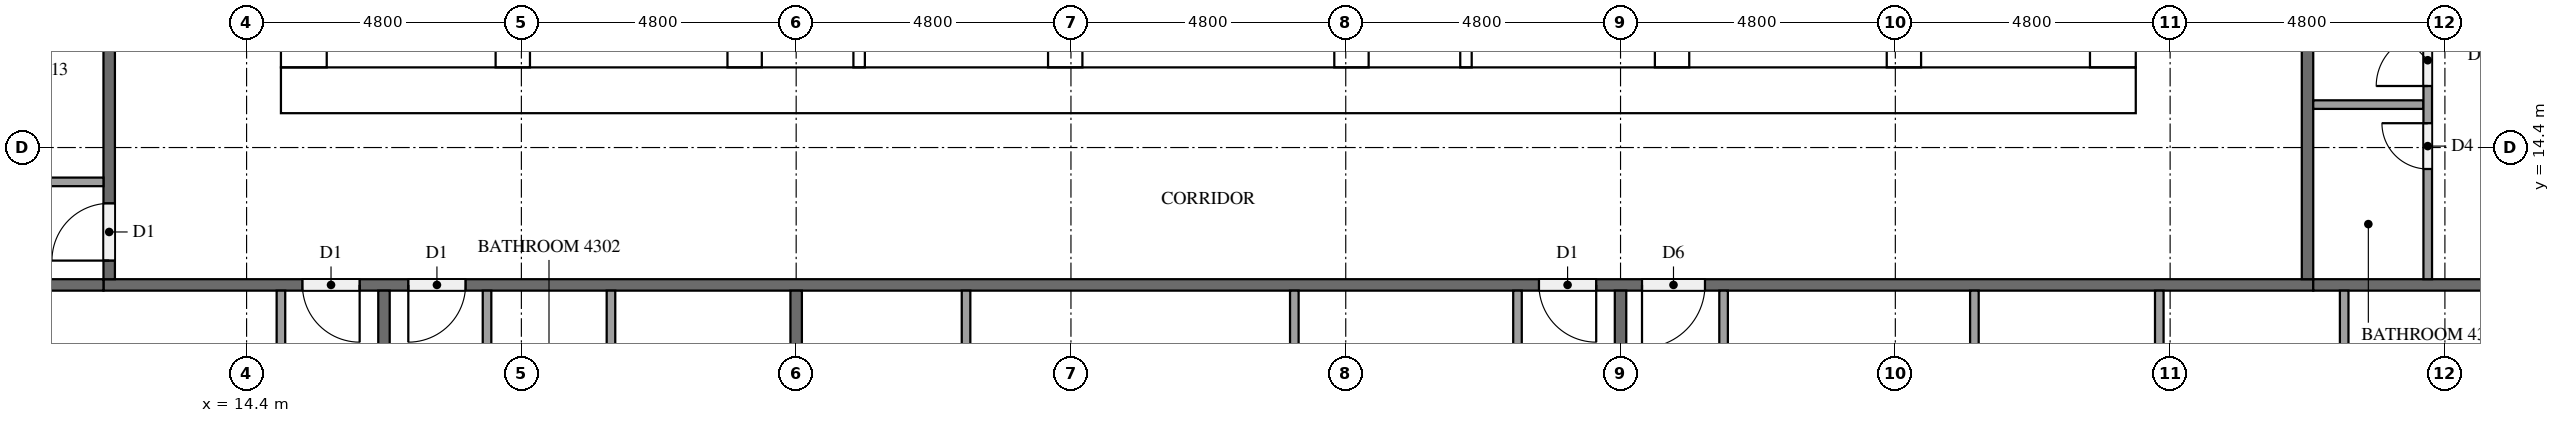
"""IFC4 building model, lengths in metres.
Left out: names, types, materials, properties, quantities, classifications, styles, units other than length and angle.
Written with IfcOpenShell. Run it as: python <this file> out.ifc"""

import sys

from ifc_helpers import new_model, si_unit, direction, frame, frame_2d, origin, place, context, subcontext, project, spatial, rectangle, extrude, element, fill, save


model = new_model("IFC4")
c1 = context("Model", 3, precision=1e-05, world=origin(), true_north=direction((0.0, 1.0)))
c2 = subcontext(c1, "Body", "Model", "MODEL_VIEW")
j1 = project(units=[si_unit("LENGTHUNIT", "METRE"), si_unit("PLANEANGLEUNIT", "RADIAN")], contexts=[c1])
p1 = place(None, origin())
s1 = spatial("IfcSite", under=j1, at=p1, CompositionType="ELEMENT")
p2 = place(p1, origin())
s2 = spatial("IfcBuilding", under=s1, at=p2, CompositionType="ELEMENT")
p3 = place(p2, frame((0.0, 0.0, 166.5)))
s3 = spatial("IfcBuildingStorey", under=s2, at=p3, CompositionType="ELEMENT", Elevation=166.5)
p4 = place(p3, frame((15.0, 15.4, 0.0), z_axis=(0.0, 0.0, 1.0), x_axis=(1.0, 0.0, 0.0)))
e1 = element("IfcWall", 1, at=p4, inside=s3, PredefinedType="SHEAR", context=c2, shape_type="SweptSolid", body=[
    extrude(rectangle(XDim=32.4, YDim=0.8, at=frame_2d((16.2, 0.0))), origin(), (0.0, 0.0, 1.0), 3.2),
])
p5 = place(p4, frame((15.3, 0.0, 0.0)))
e2 = element("IfcOpeningElement", 2, at=p5, cuts=e1, PredefinedType="OPENING", context=c2, shape_type="SweptSolid", body=[
    extrude(rectangle(XDim=1.8, YDim=2.1, at=frame_2d((0.9, 1.05))), frame((0.0, 0.41, 0.0), z_axis=(0.0, -1.0, 0.0), x_axis=(1.0, 0.0, 0.0)), (0.0, 0.0, 1.0), 0.82),
])
p6 = place(p3, frame((15.4, 15.8, 0.0), z_axis=(0.0, 0.0, 1.0), x_axis=(0.0, 1.0, 0.0)))
e3 = element("IfcWall", 3, at=p6, inside=s3, PredefinedType="SHEAR", context=c2, shape_type="SweptSolid", body=[
    extrude(rectangle(XDim=21.2, YDim=0.8, at=frame_2d((10.6, 0.0))), origin(), (0.0, 0.0, 1.0), 3.2),
])
p7 = place(p6, frame((4.96, 0.0, 0.0)))
e4 = element("IfcOpeningElement", 4, at=p7, cuts=e3, PredefinedType="OPENING", context=c2, shape_type="SweptSolid", body=[
    extrude(rectangle(XDim=1.2, YDim=2.1, at=frame_2d((0.6, 1.05))), frame((0.0, 0.41, 0.0), z_axis=(0.0, -1.0, 0.0), x_axis=(1.0, 0.0, 0.0)), (0.0, 0.0, 1.0), 0.82),
])
p8 = place(p3, frame((47.0, 15.8, 0.0), z_axis=(0.0, 0.0, 1.0), x_axis=(0.0, 1.0, 0.0)))
e5 = element("IfcWall", 5, at=p8, inside=s3, PredefinedType="SHEAR", context=c2, shape_type="SweptSolid", body=[
    extrude(rectangle(XDim=21.2, YDim=0.8, at=frame_2d((10.6, 0.0))), origin(), (0.0, 0.0, 1.0), 3.2),
])
p9 = place(p8, frame((10.3, 0.0, 0.0)))
e6 = element("IfcOpeningElement", 6, at=p9, cuts=e5, PredefinedType="OPENING", context=c2, shape_type="SweptSolid", body=[
    extrude(rectangle(XDim=1.2, YDim=2.1, at=frame_2d((0.6, 1.05))), frame((0.0, 0.41, 0.0), z_axis=(0.0, -1.0, 0.0), x_axis=(1.0, 0.0, 0.0)), (0.0, 0.0, 1.0), 0.82),
])
p10 = place(p3, frame((19.05, 15.8, 0.0), z_axis=(0.0, 0.0, 1.0), x_axis=(0.0, 1.0, 0.0)))
e7 = element("IfcWall", 7, at=p10, inside=s3, PredefinedType="SHEAR", context=c2, shape_type="SweptSolid", body=[
    extrude(rectangle(XDim=15.15, YDim=0.6, at=frame_2d((7.575, 0.0))), origin(), (0.0, 0.0, 1.0), 3.2),
])
p11 = place(p10, frame((9.65, 0.0, 0.0)))
e8 = element("IfcOpeningElement", 8, at=p11, cuts=e7, PredefinedType="OPENING", context=c2, shape_type="SweptSolid", body=[
    extrude(rectangle(XDim=1.1, YDim=2.1, at=frame_2d((0.55, 1.05))), frame((0.0, 0.31, 0.0), z_axis=(0.0, -1.0, 0.0), x_axis=(1.0, 0.0, 0.0)), (0.0, 0.0, 1.0), 0.62),
])
p12 = place(p10, frame((13.15, 0.0, 0.0)))
e9 = element("IfcOpeningElement", 9, at=p12, cuts=e7, PredefinedType="OPENING", context=c2, shape_type="SweptSolid", body=[
    extrude(rectangle(XDim=1.1, YDim=2.1, at=frame_2d((0.55, 1.05))), frame((0.0, 0.31, 0.0), z_axis=(0.0, -1.0, 0.0), x_axis=(1.0, 0.0, 0.0)), (0.0, 0.0, 1.0), 0.62),
])
p13 = place(p10, frame((0.4, 0.0, 0.0)))
e10 = element("IfcOpeningElement", 10, at=p13, cuts=e7, PredefinedType="OPENING", context=c2, shape_type="SweptSolid", body=[
    extrude(rectangle(XDim=1.2, YDim=2.1, at=frame_2d((0.6, 1.05))), frame((0.0, 0.31, 0.0), z_axis=(0.0, -1.0, 0.0), x_axis=(1.0, 0.0, 0.0)), (0.0, 0.0, 1.0), 0.62),
])
p14 = place(p3, frame((23.1, 15.8, 0.0), z_axis=(0.0, 0.0, 1.0), x_axis=(0.0, 1.0, 0.0)))
e11 = element("IfcWall", 11, at=p14, inside=s3, PredefinedType="SHEAR", context=c2, shape_type="SweptSolid", body=[
    extrude(rectangle(XDim=21.2, YDim=0.6, at=frame_2d((10.6, 0.0))), origin(), (0.0, 0.0, 1.0), 3.2),
])
p15 = place(p3, frame((39.3, 15.8, 0.0), z_axis=(0.0, 0.0, 1.0), x_axis=(0.0, 1.0, 0.0)))
e12 = element("IfcWall", 12, at=p15, inside=s3, PredefinedType="SHEAR", context=c2, shape_type="SweptSolid", body=[
    extrude(rectangle(XDim=8.45, YDim=0.6, at=frame_2d((4.225, 0.0))), origin(), (0.0, 0.0, 1.0), 3.2),
])
p16 = place(p3, frame((43.35, 15.8, 0.0), z_axis=(0.0, 0.0, 1.0), x_axis=(0.0, 1.0, 0.0)))
e13 = element("IfcWall", 13, at=p16, inside=s3, PredefinedType="SHEAR", context=c2, shape_type="SweptSolid", body=[
    extrude(rectangle(XDim=8.45, YDim=0.6, at=frame_2d((4.225, 0.0))), origin(), (0.0, 0.0, 1.0), 3.2),
])
p17 = place(p16, frame((0.4, 0.0, 0.0)))
e14 = element("IfcOpeningElement", 14, at=p17, cuts=e13, PredefinedType="OPENING", context=c2, shape_type="SweptSolid", body=[
    extrude(rectangle(XDim=1.2, YDim=2.1, at=frame_2d((0.6, 1.05))), frame((0.0, 0.31, 0.0), z_axis=(0.0, -1.0, 0.0), x_axis=(1.0, 0.0, 0.0)), (0.0, 0.0, 1.0), 0.62),
])
for number, where, z_axis, x_axis in (
    (15, (28.7, 15.8, 0.0), (0.0, 0.0, 1.0), (0.0, 1.0, 0.0)),
    (16, (33.7, 15.8, 0.0), (0.0, 0.0, 1.0), (0.0, 1.0, 0.0)),
):
    element("IfcWall", number, at=place(p3, frame(where, z_axis=z_axis, x_axis=x_axis)), inside=s3, PredefinedType="SHEAR", context=c2, shape_type="SweptSolid", body=[
        extrude(rectangle(XDim=2.65, YDim=0.6, at=frame_2d((1.325, 0.0))), origin(), (0.0, 0.0, 1.0), 3.2),
    ])
for number, where, z_axis, x_axis in (
    (17, (25.1, 15.8, 0.0), (0.0, 0.0, 1.0), (0.0, 1.0, 0.0)),
    (18, (35.7, 15.8, 0.0), (0.0, 0.0, 1.0), (0.0, 1.0, 0.0)),
):
    element("IfcWall", number, at=place(p3, frame(where, z_axis=z_axis, x_axis=x_axis)), inside=s3, PredefinedType="PARTITIONING", context=c2, shape_type="SweptSolid", body=[
        extrude(rectangle(XDim=2.65, YDim=0.2, at=frame_2d((1.325, 0.0))), origin(), (0.0, 0.0, 1.0), 3.2),
    ])
p18 = place(p3, frame((50.5, 12.0, 0.0), z_axis=(0.0, 0.0, 1.0), x_axis=(-1.0, 0.0, 0.0)))
e19 = element("IfcWall", 19, at=p18, inside=s3, PredefinedType="PARTITIONING", context=c2, shape_type="SweptSolid", body=[
    extrude(rectangle(XDim=38.6, YDim=0.2, at=frame_2d((19.3, 0.0))), origin(), (0.0, 0.0, 1.0), 3.2),
])
p19 = place(p18, frame((34.125, 0.0, 0.0)))
e20 = element("IfcOpeningElement", 20, at=p19, cuts=e19, PredefinedType="OPENING", context=c2, shape_type="SweptSolid", body=[
    extrude(rectangle(XDim=1.0, YDim=2.1, at=frame_2d((0.5, 1.05))), frame((0.0, 0.11, 0.0), z_axis=(0.0, -1.0, 0.0), x_axis=(1.0, 0.0, 0.0)), (0.0, 0.0, 1.0), 0.22),
])
p20 = place(p18, frame((32.275, 0.0, 0.0)))
e21 = element("IfcOpeningElement", 21, at=p20, cuts=e19, PredefinedType="OPENING", context=c2, shape_type="SweptSolid", body=[
    extrude(rectangle(XDim=1.0, YDim=2.1, at=frame_2d((0.5, 1.05))), frame((0.0, 0.11, 0.0), z_axis=(0.0, -1.0, 0.0), x_axis=(1.0, 0.0, 0.0)), (0.0, 0.0, 1.0), 0.22),
])
p21 = place(p18, frame((12.525, 0.0, 0.0)))
e22 = element("IfcOpeningElement", 22, at=p21, cuts=e19, PredefinedType="OPENING", context=c2, shape_type="SweptSolid", body=[
    extrude(rectangle(XDim=1.0, YDim=2.1, at=frame_2d((0.5, 1.05))), frame((0.0, 0.11, 0.0), z_axis=(0.0, -1.0, 0.0), x_axis=(1.0, 0.0, 0.0)), (0.0, 0.0, 1.0), 0.22),
])
p22 = place(p18, frame((10.625, 0.0, 0.0)))
e23 = element("IfcOpeningElement", 23, at=p22, cuts=e19, PredefinedType="OPENING", context=c2, shape_type="SweptSolid", body=[
    extrude(rectangle(XDim=1.1, YDim=2.1, at=frame_2d((0.55, 1.05))), frame((0.0, 0.11, 0.0), z_axis=(0.0, -1.0, 0.0), x_axis=(1.0, 0.0, 0.0)), (0.0, 0.0, 1.0), 0.22),
])
p23 = place(p3, frame((50.4, 40.7, 0.0), z_axis=(0.0, 0.0, 1.0), x_axis=(0.0, -1.0, 0.0)))
e24 = element("IfcWall", 24, at=p23, inside=s3, PredefinedType="PARTITIONING", context=c2, shape_type="SweptSolid", body=[
    extrude(rectangle(XDim=28.6, YDim=0.2, at=frame_2d((14.3, 0.0))), origin(), (0.0, 0.0, 1.0), 3.2),
])
p24 = place(p23, frame((19.525, 0.0, 0.0)))
e25 = element("IfcOpeningElement", 25, at=p24, cuts=e24, PredefinedType="OPENING", context=c2, shape_type="SweptSolid", body=[
    extrude(rectangle(XDim=1.0, YDim=2.1, at=frame_2d((0.5, 1.05))), frame((0.0, 0.11, 0.0), z_axis=(0.0, -1.0, 0.0), x_axis=(1.0, 0.0, 0.0)), (0.0, 0.0, 1.0), 0.22),
])
p25 = place(p23, frame((17.675, 0.0, 0.0)))
e26 = element("IfcOpeningElement", 26, at=p25, cuts=e24, PredefinedType="OPENING", context=c2, shape_type="SweptSolid", body=[
    extrude(rectangle(XDim=1.0, YDim=2.1, at=frame_2d((0.5, 1.05))), frame((0.0, 0.11, 0.0), z_axis=(0.0, -1.0, 0.0), x_axis=(1.0, 0.0, 0.0)), (0.0, 0.0, 1.0), 0.22),
])
p26 = place(p23, frame((8.075, 0.0, 0.0)))
e27 = element("IfcOpeningElement", 27, at=p26, cuts=e24, PredefinedType="OPENING", context=c2, shape_type="SweptSolid", body=[
    extrude(rectangle(XDim=1.0, YDim=2.1, at=frame_2d((0.5, 1.05))), frame((0.0, 0.11, 0.0), z_axis=(0.0, -1.0, 0.0), x_axis=(1.0, 0.0, 0.0)), (0.0, 0.0, 1.0), 0.22),
])
p27 = place(p3, frame((12.0, 12.1, 0.0), z_axis=(0.0, 0.0, 1.0), x_axis=(0.0, 1.0, 0.0)))
e28 = element("IfcWall", 28, at=p27, inside=s3, PredefinedType="PARTITIONING", context=c2, shape_type="SweptSolid", body=[
    extrude(rectangle(XDim=28.6, YDim=0.2, at=frame_2d((14.3, 0.0))), origin(), (0.0, 0.0, 1.0), 3.2),
])
p28 = place(p27, frame((24.325, 0.0, 0.0)))
e29 = element("IfcOpeningElement", 29, at=p28, cuts=e28, PredefinedType="OPENING", context=c2, shape_type="SweptSolid", body=[
    extrude(rectangle(XDim=1.0, YDim=2.1, at=frame_2d((0.5, 1.05))), frame((0.0, 0.11, 0.0), z_axis=(0.0, -1.0, 0.0), x_axis=(1.0, 0.0, 0.0)), (0.0, 0.0, 1.0), 0.22),
])
p29 = place(p27, frame((22.475, 0.0, 0.0)))
e30 = element("IfcOpeningElement", 30, at=p29, cuts=e28, PredefinedType="OPENING", context=c2, shape_type="SweptSolid", body=[
    extrude(rectangle(XDim=1.0, YDim=2.1, at=frame_2d((0.5, 1.05))), frame((0.0, 0.11, 0.0), z_axis=(0.0, -1.0, 0.0), x_axis=(1.0, 0.0, 0.0)), (0.0, 0.0, 1.0), 0.22),
])
p30 = place(p27, frame((0.325, 0.0, 0.0)))
e31 = element("IfcOpeningElement", 31, at=p30, cuts=e28, PredefinedType="OPENING", context=c2, shape_type="SweptSolid", body=[
    extrude(rectangle(XDim=1.0, YDim=2.1, at=frame_2d((0.5, 1.05))), frame((0.0, 0.11, 0.0), z_axis=(0.0, -1.0, 0.0), x_axis=(1.0, 0.0, 0.0)), (0.0, 0.0, 1.0), 0.22),
])
for number, where, z_axis, x_axis in (
    (32, (16.8, 11.9, 0.0), (0.0, 0.0, 1.0), (0.0, -1.0, 0.0)),
    (33, (0.1, 12.0, 0.0), (0.0, 0.0, 1.0), (1.0, 0.0, 0.0)),
):
    element("IfcWall", number, at=place(p3, frame(where, z_axis=z_axis, x_axis=x_axis)), inside=s3, PredefinedType="PARTITIONING", context=c2, shape_type="SweptSolid", body=[
        extrude(rectangle(XDim=11.8, YDim=0.2, at=frame_2d((5.9, 0.0))), origin(), (0.0, 0.0, 1.0), 3.2),
    ])
p31 = place(p3, frame((24.0, 11.9, 0.0), z_axis=(0.0, 0.0, 1.0), x_axis=(0.0, -1.0, 0.0)))
e34 = element("IfcWall", 34, at=p31, inside=s3, PredefinedType="PARTITIONING", context=c2, shape_type="SweptSolid", body=[
    extrude(rectangle(XDim=11.525, YDim=0.2, at=frame_2d((5.762, 0.0))), origin(), (0.0, 0.0, 1.0), 3.2),
])
p32 = place(p3, frame((38.4, 11.9, 0.0), z_axis=(0.0, 0.0, 1.0), x_axis=(0.0, -1.0, 0.0)))
e35 = element("IfcWall", 35, at=p32, inside=s3, PredefinedType="PARTITIONING", context=c2, shape_type="SweptSolid", body=[
    extrude(rectangle(XDim=11.8, YDim=0.2, at=frame_2d((5.9, 0.0))), origin(), (0.0, 0.0, 1.0), 3.2),
])
p33 = place(p3, frame((50.5, 12.0, 0.0), z_axis=(0.0, 0.0, 1.0), x_axis=(1.0, 0.0, 0.0)))
e36 = element("IfcWall", 36, at=p33, inside=s3, PredefinedType="PARTITIONING", context=c2, shape_type="SweptSolid", body=[
    extrude(rectangle(XDim=7.0, YDim=0.2, at=frame_2d((3.5, 0.0))), origin(), (0.0, 0.0, 1.0), 3.2),
])
p34 = place(p3, frame((15.0, 11.9, 0.0), z_axis=(0.0, 0.0, 1.0), x_axis=(0.0, -1.0, 0.0)))
e37 = element("IfcWall", 37, at=p34, inside=s3, PredefinedType="PARTITIONING", context=c2, shape_type="SweptSolid", body=[
    extrude(rectangle(XDim=3.125, YDim=0.15, at=frame_2d((1.562, 0.0))), origin(), (0.0, 0.0, 1.0), 3.2),
])
p35 = place(p3, frame((20.765, 11.9, 0.0), z_axis=(0.0, 0.0, 1.0), x_axis=(0.0, -1.0, 0.0)))
e38 = element("IfcWall", 38, at=p35, inside=s3, PredefinedType="PARTITIONING", context=c2, shape_type="SweptSolid", body=[
    extrude(rectangle(XDim=2.975, YDim=0.15, at=frame_2d((1.487, 0.0))), origin(), (0.0, 0.0, 1.0), 3.2),
])
for number, where, z_axis, x_axis in (
    (39, (18.6, 11.9, 0.0), (0.0, 0.0, 1.0), (0.0, -1.0, 0.0)),
    (40, (32.702, 11.9, 0.0), (0.0, 0.0, 1.0), (0.0, -1.0, 0.0)),
    (41, (26.967, 11.9, 0.0), (0.0, 0.0, 1.0), (0.0, -1.0, 0.0)),
):
    element("IfcWall", number, at=place(p3, frame(where, z_axis=z_axis, x_axis=x_axis)), inside=s3, PredefinedType="PARTITIONING", context=c2, shape_type="SweptSolid", body=[
        extrude(rectangle(XDim=3.125, YDim=0.15, at=frame_2d((1.562, 0.0))), origin(), (0.0, 0.0, 1.0), 3.2),
    ])
p36 = place(p3, frame((36.6, 11.9, 0.0), z_axis=(0.0, 0.0, 1.0), x_axis=(0.0, -1.0, 0.0)))
e42 = element("IfcWall", 42, at=p36, inside=s3, PredefinedType="PARTITIONING", context=c2, shape_type="SweptSolid", body=[
    extrude(rectangle(XDim=3.275, YDim=0.15, at=frame_2d((1.637, 0.0))), origin(), (0.0, 0.0, 1.0), 3.2),
])
for number, where, z_axis, x_axis in (
    (43, (44.581, 11.9, 0.0), (0.0, 0.0, 1.0), (0.0, -1.0, 0.0)),
    (44, (47.811, 11.9, 0.0), (0.0, 0.0, 1.0), (0.0, -1.0, 0.0)),
    (45, (51.041, 11.9, 0.0), (0.0, 0.0, 1.0), (0.0, -1.0, 0.0)),
):
    element("IfcWall", number, at=place(p3, frame(where, z_axis=z_axis, x_axis=x_axis)), inside=s3, PredefinedType="PARTITIONING", context=c2, shape_type="SweptSolid", body=[
        extrude(rectangle(XDim=4.175, YDim=0.15, at=frame_2d((2.087, 0.0))), origin(), (0.0, 0.0, 1.0), 3.2),
    ])
p37 = place(p3, frame((40.2, 11.9, 0.0), z_axis=(0.0, 0.0, 1.0), x_axis=(0.0, -1.0, 0.0)))
e46 = element("IfcWall", 46, at=p37, inside=s3, PredefinedType="PARTITIONING", context=c2, shape_type="SweptSolid", body=[
    extrude(rectangle(XDim=4.325, YDim=0.15, at=frame_2d((2.163, 0.0))), origin(), (0.0, 0.0, 1.0), 3.2),
])
p38 = place(p3, frame((50.5, 15.15, 0.0), z_axis=(0.0, 0.0, 1.0), x_axis=(1.0, 0.0, 0.0)))
e47 = element("IfcWall", 47, at=p38, inside=s3, PredefinedType="PARTITIONING", context=c2, shape_type="SweptSolid", body=[
    extrude(rectangle(XDim=1.925, YDim=0.15, at=frame_2d((0.962, 0.0))), origin(), (0.0, 0.0, 1.0), 3.2),
])
p39 = place(p3, frame((52.5, 12.1, 0.0), z_axis=(0.0, 0.0, 1.0), x_axis=(0.0, 1.0, 0.0)))
e48 = element("IfcWall", 48, at=p39, inside=s3, PredefinedType="PARTITIONING", context=c2, shape_type="SweptSolid", body=[
    extrude(rectangle(XDim=7.625, YDim=0.15, at=frame_2d((3.812, 0.0))), origin(), (0.0, 0.0, 1.0), 3.2),
])
p40 = place(p39, frame((3.375, 0.0, 0.0)))
e49 = element("IfcOpeningElement", 49, at=p40, cuts=e48, PredefinedType="OPENING", context=c2, shape_type="SweptSolid", body=[
    extrude(rectangle(XDim=0.9, YDim=2.1, at=frame_2d((0.45, 1.05))), frame((0.0, 0.085, 0.0), z_axis=(0.0, -1.0, 0.0), x_axis=(1.0, 0.0, 0.0)), (0.0, 0.0, 1.0), 0.17),
])
p41 = place(p39, frame((1.925, 0.0, 0.0)))
e50 = element("IfcOpeningElement", 50, at=p41, cuts=e48, PredefinedType="OPENING", context=c2, shape_type="SweptSolid", body=[
    extrude(rectangle(XDim=0.8, YDim=2.1, at=frame_2d((0.4, 1.05))), frame((0.0, 0.085, 0.0), z_axis=(0.0, -1.0, 0.0), x_axis=(1.0, 0.0, 0.0)), (0.0, 0.0, 1.0), 0.17),
])
p42 = place(p3, frame((11.9, 13.8, 0.0), z_axis=(0.0, 0.0, 1.0), x_axis=(-1.0, 0.0, 0.0)))
e51 = element("IfcWall", 51, at=p42, inside=s3, PredefinedType="PARTITIONING", context=c2, shape_type="SweptSolid", body=[
    extrude(rectangle(XDim=3.875, YDim=0.15, at=frame_2d((1.938, 0.0))), origin(), (0.0, 0.0, 1.0), 3.2),
])
p43 = place(p5, frame((1.8, 0.0, 0.0), z_axis=(0.0, 0.0, 1.0), x_axis=(-1.0, 0.0, 0.0)))
e52 = element("IfcDoor", 52, at=p43, inside=s3, OperationType="DOUBLE_DOOR_SINGLE_SWING", PredefinedType="DOOR", context=c2, shape_type="SweptSolid", body=[
    extrude(rectangle(XDim=1.8, YDim=2.1, at=frame_2d((0.9, 1.05))), frame((0.0, 0.025, 0.0), z_axis=(0.0, -1.0, 0.0), x_axis=(1.0, 0.0, 0.0)), (0.0, 0.0, 1.0), 0.05),
])
fill(e2, e52)
p44 = place(p19, origin())
e53 = element("IfcDoor", 53, at=p44, inside=s3, OperationType="SINGLE_SWING_LEFT", PredefinedType="DOOR", context=c2, shape_type="SweptSolid", body=[
    extrude(rectangle(XDim=1.0, YDim=2.1, at=frame_2d((0.5, 1.05))), frame((0.0, 0.025, 0.0), z_axis=(0.0, -1.0, 0.0), x_axis=(1.0, 0.0, 0.0)), (0.0, 0.0, 1.0), 0.05),
])
fill(e20, e53)
p45 = place(p20, origin())
e54 = element("IfcDoor", 54, at=p45, inside=s3, OperationType="SINGLE_SWING_RIGHT", PredefinedType="DOOR", context=c2, shape_type="SweptSolid", body=[
    extrude(rectangle(XDim=1.0, YDim=2.1, at=frame_2d((0.5, 1.05))), frame((0.0, 0.025, 0.0), z_axis=(0.0, -1.0, 0.0), x_axis=(1.0, 0.0, 0.0)), (0.0, 0.0, 1.0), 0.05),
])
fill(e21, e54)
p46 = place(p21, origin())
e55 = element("IfcDoor", 55, at=p46, inside=s3, OperationType="SINGLE_SWING_LEFT", PredefinedType="DOOR", context=c2, shape_type="SweptSolid", body=[
    extrude(rectangle(XDim=1.0, YDim=2.1, at=frame_2d((0.5, 1.05))), frame((0.0, 0.025, 0.0), z_axis=(0.0, -1.0, 0.0), x_axis=(1.0, 0.0, 0.0)), (0.0, 0.0, 1.0), 0.05),
])
fill(e22, e55)
p47 = place(p22, origin())
e56 = element("IfcDoor", 56, at=p47, inside=s3, OperationType="SINGLE_SWING_RIGHT", PredefinedType="DOOR", context=c2, shape_type="SweptSolid", body=[
    extrude(rectangle(XDim=1.1, YDim=2.1, at=frame_2d((0.55, 1.05))), frame((0.0, 0.025, 0.0), z_axis=(0.0, -1.0, 0.0), x_axis=(1.0, 0.0, 0.0)), (0.0, 0.0, 1.0), 0.05),
])
fill(e23, e56)
p48 = place(p30, origin())
e57 = element("IfcDoor", 57, at=p48, inside=s3, OperationType="SINGLE_SWING_LEFT", PredefinedType="DOOR", context=c2, shape_type="SweptSolid", body=[
    extrude(rectangle(XDim=1.0, YDim=2.1, at=frame_2d((0.5, 1.05))), frame((0.0, 0.025, 0.0), z_axis=(0.0, -1.0, 0.0), x_axis=(1.0, 0.0, 0.0)), (0.0, 0.0, 1.0), 0.05),
])
fill(e31, e57)
p49 = place(p40, origin())
e58 = element("IfcDoor", 58, at=p49, inside=s3, OperationType="SINGLE_SWING_LEFT", PredefinedType="DOOR", context=c2, shape_type="SweptSolid", body=[
    extrude(rectangle(XDim=0.9, YDim=2.1, at=frame_2d((0.45, 1.05))), frame((0.0, 0.025, 0.0), z_axis=(0.0, -1.0, 0.0), x_axis=(1.0, 0.0, 0.0)), (0.0, 0.0, 1.0), 0.05),
])
fill(e49, e58)
p50 = place(p41, origin())
e59 = element("IfcDoor", 59, at=p50, inside=s3, OperationType="SINGLE_SWING_RIGHT", PredefinedType="DOOR", context=c2, shape_type="SweptSolid", body=[
    extrude(rectangle(XDim=0.8, YDim=2.1, at=frame_2d((0.4, 1.05))), frame((0.0, 0.025, 0.0), z_axis=(0.0, -1.0, 0.0), x_axis=(1.0, 0.0, 0.0)), (0.0, 0.0, 1.0), 0.05),
])
fill(e50, e59)
save(model, sys.argv[1])
